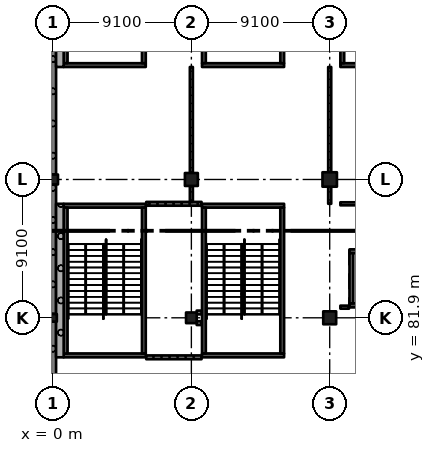
"""IFC4 building model, lengths in metres.
Left out: names, types, materials, properties, quantities, classifications, styles, units other than length and angle.
Written with IfcOpenShell. Run it as: python <this file> out.ifc"""

import sys

from ifc_helpers import new_model, si_unit, direction, frame, frame_2d, origin, origin_2d, place, context, subcontext, project, spatial, rectangle, extrude, element, fill, save


model = new_model("IFC4")
c1 = context("Model", 3, precision=1e-05, world=origin(), true_north=direction((0.0, 1.0)))
c2 = subcontext(c1, "Body", "Model", "MODEL_VIEW")
j1 = project(units=[si_unit("LENGTHUNIT", "METRE"), si_unit("PLANEANGLEUNIT", "RADIAN")], contexts=[c1])
p1 = place(None, origin())
s1 = spatial("IfcSite", under=j1, at=p1, CompositionType="ELEMENT")
p2 = place(p1, origin())
s2 = spatial("IfcBuilding", under=s1, at=p2, CompositionType="ELEMENT")
p3 = place(p2, origin())
s3 = spatial("IfcBuildingStorey", under=s2, at=p3, CompositionType="ELEMENT", Elevation=0.0)
p4 = place(p3, frame((0.0, 81.9, -0.4), z_axis=(0.0, 0.0, 1.0), x_axis=(1.0, 0.0, 0.0)))
e1 = element("IfcColumn", 1, at=p4, inside=s3, PredefinedType="COLUMN", context=c2, shape_type="SweptSolid", body=[
    extrude(rectangle(XDim=0.5, YDim=0.5, at=origin_2d()), origin(), (0.0, 0.0, 1.0), 6.77),
])
p5 = place(p3, frame((0.0, 91.0, -0.4), z_axis=(0.0, 0.0, 1.0), x_axis=(1.0, 0.0, 0.0)))
e2 = element("IfcColumn", 2, at=p5, inside=s3, PredefinedType="COLUMN", context=c2, shape_type="SweptSolid", body=[
    extrude(rectangle(XDim=0.65, YDim=0.65, at=origin_2d()), origin(), (0.0, 0.0, 1.0), 6.77),
])
p6 = place(p3, frame((9.1, 81.9, -0.4), z_axis=(0.0, 0.0, 1.0), x_axis=(1.0, 0.0, 0.0)))
e3 = element("IfcColumn", 3, at=p6, inside=s3, PredefinedType="COLUMN", context=c2, shape_type="SweptSolid", body=[
    extrude(rectangle(XDim=0.7, YDim=0.7, at=origin_2d()), origin(), (0.0, 0.0, 1.0), 6.77),
])
for number, where, z_axis, x_axis in (
    (4, (9.1, 91.0, -0.4), (0.0, 0.0, 1.0), (1.0, 0.0, 0.0)),
    (5, (18.2, 81.9, -0.4), (0.0, 0.0, 1.0), (1.0, 0.0, 0.0)),
):
    element("IfcColumn", number, at=place(p3, frame(where, z_axis=z_axis, x_axis=x_axis)), inside=s3, PredefinedType="COLUMN", context=c2, shape_type="SweptSolid", body=[
        extrude(rectangle(XDim=0.85, YDim=0.85, at=origin_2d()), origin(), (0.0, 0.0, 1.0), 6.77),
    ])
p7 = place(p3, frame((18.2, 91.0, -0.4), z_axis=(0.0, 0.0, 1.0), x_axis=(1.0, 0.0, 0.0)))
e6 = element("IfcColumn", 6, at=p7, inside=s3, PredefinedType="COLUMN", context=c2, shape_type="SweptSolid", body=[
    extrude(rectangle(XDim=0.95, YDim=0.95, at=origin_2d()), origin(), (0.0, 0.0, 1.0), 6.77),
])
p8 = place(p3, frame((22.5, 82.725, -1.4), z_axis=(0.0, 0.0, 1.0), x_axis=(-1.0, 0.0, 0.0)))
e7 = element("IfcWall", 7, at=p8, inside=s3, PredefinedType="SHEAR", context=c2, shape_type="SweptSolid", body=[
    extrude(rectangle(XDim=3.0, YDim=0.25, at=frame_2d((1.5, 0.0))), origin(), (0.0, 0.0, 1.0), 7.77),
])
p9 = place(p3, frame((22.5, 86.275, -1.4), z_axis=(0.0, 0.0, 1.0), x_axis=(-1.0, 0.0, 0.0)))
e8 = element("IfcWall", 8, at=p9, inside=s3, PredefinedType="SHEAR", context=c2, shape_type="SweptSolid", body=[
    extrude(rectangle(XDim=3.0, YDim=0.25, at=frame_2d((1.5, 0.0))), origin(), (0.0, 0.0, 1.0), 7.77),
])
p10 = place(p9, frame((0.95, 0.0, 1.4)))
e9 = element("IfcOpeningElement", 9, at=p10, cuts=e8, PredefinedType="OPENING", context=c2, shape_type="SweptSolid", body=[
    extrude(rectangle(XDim=1.1, YDim=2.1, at=frame_2d((0.55, 1.05))), frame((0.0, 0.135, 0.0), z_axis=(0.0, -1.0, 0.0), x_axis=(1.0, 0.0, 0.0)), (0.0, 0.0, 1.0), 0.27),
])
p11 = place(p3, frame((19.625, 86.15, -1.4), z_axis=(0.0, 0.0, 1.0), x_axis=(0.0, -1.0, 0.0)))
e10 = element("IfcWall", 10, at=p11, inside=s3, PredefinedType="SHEAR", context=c2, shape_type="SweptSolid", body=[
    extrude(rectangle(XDim=3.3, YDim=0.25, at=frame_2d((1.65, 0.0))), origin(), (0.0, 0.0, 1.0), 7.77),
])
p12 = place(p3, frame((6.1, 98.525, -0.4), z_axis=(0.0, 0.0, 1.0), x_axis=(-1.0, 0.0, 0.0)))
e11 = element("IfcWall", 11, at=p12, inside=s3, PredefinedType="SHEAR", context=c2, shape_type="SweptSolid", body=[
    extrude(rectangle(XDim=5.4, YDim=0.25, at=frame_2d((2.7, 0.0))), origin(), (0.0, 0.0, 1.0), 6.77),
])
p13 = place(p12, frame((1.5, 0.0, 0.4)))
e12 = element("IfcOpeningElement", 12, at=p13, cuts=e11, PredefinedType="OPENING", context=c2, shape_type="SweptSolid", body=[
    extrude(rectangle(XDim=2.4, YDim=2.1, at=frame_2d((1.2, 1.05))), frame((0.0, 0.135, 0.0), z_axis=(0.0, -1.0, 0.0), x_axis=(1.0, 0.0, 0.0)), (0.0, 0.0, 1.0), 0.27),
])
p14 = place(p3, frame((0.825, 108.25, -0.4), z_axis=(0.0, 0.0, 1.0), x_axis=(0.0, -1.0, 0.0)))
e13 = element("IfcWall", 13, at=p14, inside=s3, PredefinedType="SHEAR", context=c2, shape_type="SweptSolid", body=[
    extrude(rectangle(XDim=9.6, YDim=0.25, at=frame_2d((4.8, 0.0))), origin(), (0.0, 0.0, 1.0), 6.77),
])
p15 = place(p3, frame((5.975, 108.25, -0.4), z_axis=(0.0, 0.0, 1.0), x_axis=(0.0, -1.0, 0.0)))
e14 = element("IfcWall", 14, at=p15, inside=s3, PredefinedType="SHEAR", context=c2, shape_type="SweptSolid", body=[
    extrude(rectangle(XDim=9.6, YDim=0.25, at=frame_2d((4.8, 0.0))), origin(), (0.0, 0.0, 1.0), 6.77),
])
p16 = place(p15, frame((7.95, 0.0, 0.4)))
e15 = element("IfcOpeningElement", 15, at=p16, cuts=e14, PredefinedType="OPENING", context=c2, shape_type="SweptSolid", body=[
    extrude(rectangle(XDim=1.2, YDim=2.1, at=frame_2d((0.6, 1.05))), frame((0.0, 0.135, 0.0), z_axis=(0.0, -1.0, 0.0), x_axis=(1.0, 0.0, 0.0)), (0.0, 0.0, 1.0), 0.27),
])
p17 = place(p3, frame((15.2, 98.525, -0.4), z_axis=(0.0, 0.0, 1.0), x_axis=(-1.0, 0.0, 0.0)))
e16 = element("IfcWall", 16, at=p17, inside=s3, PredefinedType="SHEAR", context=c2, shape_type="SweptSolid", body=[
    extrude(rectangle(XDim=5.4, YDim=0.25, at=frame_2d((2.7, 0.0))), origin(), (0.0, 0.0, 1.0), 6.77),
])
p18 = place(p17, frame((1.5, 0.0, 0.4)))
e17 = element("IfcOpeningElement", 17, at=p18, cuts=e16, PredefinedType="OPENING", context=c2, shape_type="SweptSolid", body=[
    extrude(rectangle(XDim=2.4, YDim=2.1, at=frame_2d((1.2, 1.05))), frame((0.0, 0.135, 0.0), z_axis=(0.0, -1.0, 0.0), x_axis=(1.0, 0.0, 0.0)), (0.0, 0.0, 1.0), 0.27),
])
p19 = place(p3, frame((9.925, 108.25, -0.4), z_axis=(0.0, 0.0, 1.0), x_axis=(0.0, -1.0, 0.0)))
e18 = element("IfcWall", 18, at=p19, inside=s3, PredefinedType="SHEAR", context=c2, shape_type="SweptSolid", body=[
    extrude(rectangle(XDim=9.6, YDim=0.25, at=frame_2d((4.8, 0.0))), origin(), (0.0, 0.0, 1.0), 6.77),
])
p20 = place(p3, frame((15.075, 108.25, -0.4), z_axis=(0.0, 0.0, 1.0), x_axis=(0.0, -1.0, 0.0)))
e19 = element("IfcWall", 19, at=p20, inside=s3, PredefinedType="SHEAR", context=c2, shape_type="SweptSolid", body=[
    extrude(rectangle(XDim=9.6, YDim=0.25, at=frame_2d((4.8, 0.0))), origin(), (0.0, 0.0, 1.0), 6.77),
])
p21 = place(p20, frame((7.95, 0.0, 0.4)))
e20 = element("IfcOpeningElement", 20, at=p21, cuts=e19, PredefinedType="OPENING", context=c2, shape_type="SweptSolid", body=[
    extrude(rectangle(XDim=1.2, YDim=2.1, at=frame_2d((0.6, 1.05))), frame((0.0, 0.135, 0.0), z_axis=(0.0, -1.0, 0.0), x_axis=(1.0, 0.0, 0.0)), (0.0, 0.0, 1.0), 0.27),
])
p22 = place(p3, frame((24.3, 98.525, -0.4), z_axis=(0.0, 0.0, 1.0), x_axis=(-1.0, 0.0, 0.0)))
e21 = element("IfcWall", 21, at=p22, inside=s3, PredefinedType="SHEAR", context=c2, shape_type="SweptSolid", body=[
    extrude(rectangle(XDim=5.4, YDim=0.25, at=frame_2d((2.7, 0.0))), origin(), (0.0, 0.0, 1.0), 6.77),
])
p23 = place(p22, frame((1.5, 0.0, 0.4)))
e22 = element("IfcOpeningElement", 22, at=p23, cuts=e21, PredefinedType="OPENING", context=c2, shape_type="SweptSolid", body=[
    extrude(rectangle(XDim=2.4, YDim=2.1, at=frame_2d((1.2, 1.05))), frame((0.0, 0.135, 0.0), z_axis=(0.0, -1.0, 0.0), x_axis=(1.0, 0.0, 0.0)), (0.0, 0.0, 1.0), 0.27),
])
p24 = place(p3, frame((19.025, 108.25, -0.4), z_axis=(0.0, 0.0, 1.0), x_axis=(0.0, -1.0, 0.0)))
e23 = element("IfcWall", 23, at=p24, inside=s3, PredefinedType="SHEAR", context=c2, shape_type="SweptSolid", body=[
    extrude(rectangle(XDim=9.6, YDim=0.25, at=frame_2d((4.8, 0.0))), origin(), (0.0, 0.0, 1.0), 6.77),
])
p25 = place(p3, frame((6.1, 79.425, -0.4), z_axis=(0.0, 0.0, 1.0), x_axis=(-1.0, 0.0, 0.0)))
e24 = element("IfcWall", 24, at=p25, inside=s3, PredefinedType="SHEAR", context=c2, shape_type="SweptSolid", body=[
    extrude(rectangle(XDim=5.4, YDim=0.25, at=frame_2d((2.7, 0.0))), origin(), (0.0, 0.0, 1.0), 6.77),
])
p26 = place(p3, frame((6.1, 89.275, -0.4), z_axis=(0.0, 0.0, 1.0), x_axis=(-1.0, 0.0, 0.0)))
e25 = element("IfcWall", 25, at=p26, inside=s3, PredefinedType="SHEAR", context=c2, shape_type="SweptSolid", body=[
    extrude(rectangle(XDim=5.4, YDim=0.25, at=frame_2d((2.7, 0.0))), origin(), (0.0, 0.0, 1.0), 6.77),
])
p27 = place(p26, frame((1.5, 0.0, 0.4)))
e26 = element("IfcOpeningElement", 26, at=p27, cuts=e25, PredefinedType="OPENING", context=c2, shape_type="SweptSolid", body=[
    extrude(rectangle(XDim=2.4, YDim=2.1, at=frame_2d((1.2, 1.05))), frame((0.0, 0.135, 0.0), z_axis=(0.0, -1.0, 0.0), x_axis=(1.0, 0.0, 0.0)), (0.0, 0.0, 1.0), 0.27),
])
for number, where, z_axis, x_axis in (
    (27, (0.825, 89.15, -0.4), (0.0, 0.0, 1.0), (0.0, -1.0, 0.0)),
    (28, (5.975, 89.15, -0.4), (0.0, 0.0, 1.0), (0.0, -1.0, 0.0)),
):
    element("IfcWall", number, at=place(p3, frame(where, z_axis=z_axis, x_axis=x_axis)), inside=s3, PredefinedType="SHEAR", context=c2, shape_type="SweptSolid", body=[
        extrude(rectangle(XDim=9.6, YDim=0.25, at=frame_2d((4.8, 0.0))), origin(), (0.0, 0.0, 1.0), 6.77),
    ])
p28 = place(p3, frame((15.2, 79.425, -0.4), z_axis=(0.0, 0.0, 1.0), x_axis=(-1.0, 0.0, 0.0)))
e29 = element("IfcWall", 29, at=p28, inside=s3, PredefinedType="SHEAR", context=c2, shape_type="SweptSolid", body=[
    extrude(rectangle(XDim=5.4, YDim=0.25, at=frame_2d((2.7, 0.0))), origin(), (0.0, 0.0, 1.0), 6.77),
])
p29 = place(p3, frame((15.2, 89.275, -0.4), z_axis=(0.0, 0.0, 1.0), x_axis=(-1.0, 0.0, 0.0)))
e30 = element("IfcWall", 30, at=p29, inside=s3, PredefinedType="SHEAR", context=c2, shape_type="SweptSolid", body=[
    extrude(rectangle(XDim=5.4, YDim=0.25, at=frame_2d((2.7, 0.0))), origin(), (0.0, 0.0, 1.0), 6.77),
])
p30 = place(p29, frame((1.5, 0.0, 0.4)))
e31 = element("IfcOpeningElement", 31, at=p30, cuts=e30, PredefinedType="OPENING", context=c2, shape_type="SweptSolid", body=[
    extrude(rectangle(XDim=2.4, YDim=2.1, at=frame_2d((1.2, 1.05))), frame((0.0, 0.135, 0.0), z_axis=(0.0, -1.0, 0.0), x_axis=(1.0, 0.0, 0.0)), (0.0, 0.0, 1.0), 0.27),
])
for number, where, z_axis, x_axis in (
    (32, (9.925, 89.15, -0.4), (0.0, 0.0, 1.0), (0.0, -1.0, 0.0)),
    (33, (15.075, 89.15, -0.4), (0.0, 0.0, 1.0), (0.0, -1.0, 0.0)),
):
    element("IfcWall", number, at=place(p3, frame(where, z_axis=z_axis, x_axis=x_axis)), inside=s3, PredefinedType="SHEAR", context=c2, shape_type="SweptSolid", body=[
        extrude(rectangle(XDim=9.6, YDim=0.25, at=frame_2d((4.8, 0.0))), origin(), (0.0, 0.0, 1.0), 6.77),
    ])
p31 = place(p3, frame((0.025, 99.825, 0.0), z_axis=(0.0, 0.0, 1.0), x_axis=(0.0, -1.0, 0.0)))
e34 = element("IfcWall", 34, at=p31, inside=s3, PredefinedType="SOLIDWALL", context=c2, shape_type="SweptSolid", body=[
    extrude(rectangle(XDim=8.5, YDim=0.35, at=frame_2d((4.25, 0.0))), origin(), (0.0, 0.0, 1.0), 5.27),
])
p32 = place(p31, frame((1.625, 0.0, 0.0)))
e35 = element("IfcOpeningElement", 35, at=p32, cuts=e34, PredefinedType="OPENING", context=c2, shape_type="SweptSolid", body=[
    extrude(rectangle(XDim=2.4, YDim=2.4, at=frame_2d((1.2, 1.2))), frame((0.0, 0.185, 0.0), z_axis=(0.0, -1.0, 0.0), x_axis=(1.0, 0.0, 0.0)), (0.0, 0.0, 1.0), 0.37),
])
p33 = place(p31, frame((4.625, 0.0, 0.0)))
e36 = element("IfcOpeningElement", 36, at=p33, cuts=e34, PredefinedType="OPENING", context=c2, shape_type="SweptSolid", body=[
    extrude(rectangle(XDim=2.4, YDim=2.4, at=frame_2d((1.2, 1.2))), frame((0.0, 0.185, 0.0), z_axis=(0.0, -1.0, 0.0), x_axis=(1.0, 0.0, 0.0)), (0.0, 0.0, 1.0), 0.37),
])
p34 = place(p3, frame((0.025, 90.675, 0.0), z_axis=(0.0, 0.0, 1.0), x_axis=(0.0, -1.0, 0.0)))
e37 = element("IfcWall", 37, at=p34, inside=s3, PredefinedType="SOLIDWALL", context=c2, shape_type="SweptSolid", body=[
    extrude(rectangle(XDim=8.525, YDim=0.35, at=frame_2d((4.263, 0.0))), origin(), (0.0, 0.0, 1.0), 5.27),
])
p35 = place(p3, frame((0.025, 81.65, 0.0), z_axis=(0.0, 0.0, 1.0), x_axis=(0.0, -1.0, 0.0)))
e38 = element("IfcWall", 38, at=p35, inside=s3, PredefinedType="SOLIDWALL", context=c2, shape_type="SweptSolid", body=[
    extrude(rectangle(XDim=8.5, YDim=0.35, at=frame_2d((4.25, 0.0))), origin(), (0.0, 0.0, 1.0), 5.27),
])
p36 = place(p3, frame((0.45, 98.4, 0.0), z_axis=(0.0, 0.0, 1.0), x_axis=(0.0, 1.0, 0.0)))
e39 = element("IfcWall", 39, at=p36, inside=s3, PredefinedType="SOLIDWALL", context=c2, shape_type="SweptSolid", body=[
    extrude(rectangle(XDim=10.1, YDim=0.5, at=frame_2d((5.05, 0.0))), origin(), (0.0, 0.0, 1.0), 6.02),
])
p37 = place(p3, frame((0.45, 79.3, 0.0), z_axis=(0.0, 0.0, 1.0), x_axis=(0.0, 1.0, 0.0)))
e40 = element("IfcWall", 40, at=p37, inside=s3, PredefinedType="SOLIDWALL", context=c2, shape_type="SweptSolid", body=[
    extrude(rectangle(XDim=10.1, YDim=0.5, at=frame_2d((5.05, 0.0))), origin(), (0.0, 0.0, 1.0), 6.02),
])
p38 = place(p3, frame((6.13, 89.4, 0.0), z_axis=(0.0, 0.0, 1.0), x_axis=(1.0, 0.0, 0.0)))
e41 = element("IfcWall", 41, at=p38, inside=s3, PredefinedType="SOLIDWALL", context=c2, shape_type="SweptSolid", body=[
    extrude(rectangle(XDim=3.64, YDim=0.25, at=frame_2d((1.82, 0.0))), origin(), (0.0, 0.0, 1.0), 6.02),
])
p39 = place(p38, frame((1.02, 0.0, 0.0)))
e42 = element("IfcOpeningElement", 42, at=p39, cuts=e41, PredefinedType="OPENING", context=c2, shape_type="SweptSolid", body=[
    extrude(rectangle(XDim=1.0, YDim=2.1, at=frame_2d((0.5, 1.05))), frame((0.0, 0.135, 0.0), z_axis=(0.0, -1.0, 0.0), x_axis=(1.0, 0.0, 0.0)), (0.0, 0.0, 1.0), 0.27),
])
p40 = place(p3, frame((9.1, 90.575, 0.0), z_axis=(0.0, 0.0, 1.0), x_axis=(0.0, -1.0, 0.0)))
e43 = element("IfcWall", 43, at=p40, inside=s3, PredefinedType="PARTITIONING", context=c2, shape_type="SweptSolid", body=[
    extrude(rectangle(XDim=1.05, YDim=0.2, at=frame_2d((0.525, 0.0))), origin(), (0.0, 0.0, 1.0), 5.32),
])
p41 = place(p3, frame((9.1, 98.4, 0.0), z_axis=(0.0, 0.0, 1.0), x_axis=(0.0, -1.0, 0.0)))
e44 = element("IfcWall", 44, at=p41, inside=s3, PredefinedType="PARTITIONING", context=c2, shape_type="SweptSolid", body=[
    extrude(rectangle(XDim=6.975, YDim=0.2, at=frame_2d((3.487, 0.0))), origin(), (0.0, 0.0, 1.0), 5.32),
])
p42 = place(p41, frame((0.85, 0.0, 0.0)))
e45 = element("IfcOpeningElement", 45, at=p42, cuts=e44, PredefinedType="OPENING", context=c2, shape_type="SweptSolid", body=[
    extrude(rectangle(XDim=1.8, YDim=2.4, at=frame_2d((0.9, 1.2))), frame((0.0, 0.11, 0.0), z_axis=(0.0, -1.0, 0.0), x_axis=(1.0, 0.0, 0.0)), (0.0, 0.0, 1.0), 0.22),
])
p43 = place(p41, frame((4.35, 0.0, 0.0)))
e46 = element("IfcOpeningElement", 46, at=p43, cuts=e44, PredefinedType="OPENING", context=c2, shape_type="SweptSolid", body=[
    extrude(rectangle(XDim=1.8, YDim=2.4, at=frame_2d((0.9, 1.2))), frame((0.0, 0.11, 0.0), z_axis=(0.0, -1.0, 0.0), x_axis=(1.0, 0.0, 0.0)), (0.0, 0.0, 1.0), 0.22),
])
p44 = place(p3, frame((9.45, 81.55, 0.0), z_axis=(0.0, 0.0, 1.0), x_axis=(1.0, 0.0, 0.0)))
e47 = element("IfcWall", 47, at=p44, inside=s3, PredefinedType="SOLIDWALL", context=c2, shape_type="SweptSolid", body=[
    extrude(rectangle(XDim=0.32, YDim=0.25, at=frame_2d((0.16, 0.0))), origin(), (0.0, 0.0, 1.0), 6.02),
])
p45 = place(p3, frame((9.77, 79.3, 0.0), z_axis=(0.0, 0.0, 1.0), x_axis=(-1.0, 0.0, 0.0)))
e48 = element("IfcWall", 48, at=p45, inside=s3, PredefinedType="SOLIDWALL", context=c2, shape_type="SweptSolid", body=[
    extrude(rectangle(XDim=3.64, YDim=0.25, at=frame_2d((1.82, 0.0))), origin(), (0.0, 0.0, 1.0), 6.02),
])
p46 = place(p3, frame((9.77, 82.25, 0.0), z_axis=(0.0, 0.0, 1.0), x_axis=(-1.0, 0.0, 0.0)))
e49 = element("IfcWall", 49, at=p46, inside=s3, PredefinedType="SOLIDWALL", context=c2, shape_type="SweptSolid", body=[
    extrude(rectangle(XDim=0.32, YDim=0.25, at=frame_2d((0.16, 0.0))), origin(), (0.0, 0.0, 1.0), 6.02),
])
p47 = place(p3, frame((18.2, 90.525, 0.0), z_axis=(0.0, 0.0, 1.0), x_axis=(0.0, -1.0, 0.0)))
e50 = element("IfcWall", 50, at=p47, inside=s3, PredefinedType="PARTITIONING", context=c2, shape_type="SweptSolid", body=[
    extrude(rectangle(XDim=1.125, YDim=0.2, at=frame_2d((0.562, 0.0))), origin(), (0.0, 0.0, 1.0), 5.32),
])
p48 = place(p3, frame((18.2, 98.4, 0.0), z_axis=(0.0, 0.0, 1.0), x_axis=(0.0, -1.0, 0.0)))
e51 = element("IfcWall", 51, at=p48, inside=s3, PredefinedType="PARTITIONING", context=c2, shape_type="SweptSolid", body=[
    extrude(rectangle(XDim=6.925, YDim=0.2, at=frame_2d((3.462, 0.0))), origin(), (0.0, 0.0, 1.0), 5.32),
])
p49 = place(p48, frame((0.85, 0.0, 0.0)))
e52 = element("IfcOpeningElement", 52, at=p49, cuts=e51, PredefinedType="OPENING", context=c2, shape_type="SweptSolid", body=[
    extrude(rectangle(XDim=1.8, YDim=2.4, at=frame_2d((0.9, 1.2))), frame((0.0, 0.11, 0.0), z_axis=(0.0, -1.0, 0.0), x_axis=(1.0, 0.0, 0.0)), (0.0, 0.0, 1.0), 0.22),
])
p50 = place(p48, frame((4.25, 0.0, 0.0)))
e53 = element("IfcOpeningElement", 53, at=p50, cuts=e51, PredefinedType="OPENING", context=c2, shape_type="SweptSolid", body=[
    extrude(rectangle(XDim=1.8, YDim=2.4, at=frame_2d((0.9, 1.2))), frame((0.0, 0.11, 0.0), z_axis=(0.0, -1.0, 0.0), x_axis=(1.0, 0.0, 0.0)), (0.0, 0.0, 1.0), 0.22),
])
p51 = place(p3, frame((19.47, 82.6, 0.0), z_axis=(0.0, 0.0, 1.0), x_axis=(-1.0, 0.0, 0.0)))
e54 = element("IfcWall", 54, at=p51, inside=s3, PredefinedType="PARTITIONING", context=c2, shape_type="SweptSolid", body=[
    extrude(rectangle(XDim=0.57, YDim=0.2, at=frame_2d((0.285, 0.0))), origin(), (0.0, 0.0, 1.0), 6.02),
])
p52 = place(p3, frame((24.3, 89.4, 0.0), z_axis=(0.0, 0.0, 1.0), x_axis=(-1.0, 0.0, 0.0)))
e55 = element("IfcWall", 55, at=p52, inside=s3, PredefinedType="PARTITIONING", context=c2, shape_type="SweptSolid", body=[
    extrude(rectangle(XDim=5.4, YDim=0.2, at=frame_2d((2.7, 0.0))), origin(), (0.0, 0.0, 1.0), 6.02),
])
p53 = place(p52, frame((1.85, 0.0, 0.0)))
e56 = element("IfcOpeningElement", 56, at=p53, cuts=e55, PredefinedType="OPENING", context=c2, shape_type="SweptSolid", body=[
    extrude(rectangle(XDim=1.8, YDim=2.4, at=frame_2d((0.9, 1.2))), frame((0.0, 0.11, 0.0), z_axis=(0.0, -1.0, 0.0), x_axis=(1.0, 0.0, 0.0)), (0.0, 0.0, 1.0), 0.22),
])
p54 = place(p32, frame((2.4, 0.0, 0.0), z_axis=(0.0, 0.0, 1.0), x_axis=(-1.0, 0.0, 0.0)))
e57 = element("IfcDoor", 57, at=p54, inside=s3, OperationType="DOUBLE_DOOR_SINGLE_SWING", PredefinedType="DOOR", context=c2, shape_type="SweptSolid", body=[
    extrude(rectangle(XDim=2.4, YDim=2.4, at=frame_2d((1.2, 1.2))), frame((0.0, 0.025, 0.0), z_axis=(0.0, -1.0, 0.0), x_axis=(1.0, 0.0, 0.0)), (0.0, 0.0, 1.0), 0.05),
])
fill(e35, e57)
p55 = place(p33, frame((2.4, 0.0, 0.0), z_axis=(0.0, 0.0, 1.0), x_axis=(-1.0, 0.0, 0.0)))
e58 = element("IfcDoor", 58, at=p55, inside=s3, OperationType="DOUBLE_DOOR_SINGLE_SWING", PredefinedType="DOOR", context=c2, shape_type="SweptSolid", body=[
    extrude(rectangle(XDim=2.4, YDim=2.4, at=frame_2d((1.2, 1.2))), frame((0.0, 0.025, 0.0), z_axis=(0.0, -1.0, 0.0), x_axis=(1.0, 0.0, 0.0)), (0.0, 0.0, 1.0), 0.05),
])
fill(e36, e58)
p56 = place(p39, origin())
e59 = element("IfcDoor", 59, at=p56, inside=s3, OperationType="SINGLE_SWING_RIGHT", PredefinedType="DOOR", context=c2, shape_type="SweptSolid", body=[
    extrude(rectangle(XDim=1.0, YDim=2.1, at=frame_2d((0.5, 1.05))), frame((0.0, 0.025, 0.0), z_axis=(0.0, -1.0, 0.0), x_axis=(1.0, 0.0, 0.0)), (0.0, 0.0, 1.0), 0.05),
])
fill(e42, e59)
p57 = place(p42, origin())
e60 = element("IfcDoor", 60, at=p57, inside=s3, OperationType="DOUBLE_DOOR_SINGLE_SWING", PredefinedType="DOOR", context=c2, shape_type="SweptSolid", body=[
    extrude(rectangle(XDim=1.8, YDim=2.4, at=frame_2d((0.9, 1.2))), frame((0.0, 0.025, 0.0), z_axis=(0.0, -1.0, 0.0), x_axis=(1.0, 0.0, 0.0)), (0.0, 0.0, 1.0), 0.05),
])
fill(e45, e60)
p58 = place(p43, origin())
e61 = element("IfcDoor", 61, at=p58, inside=s3, OperationType="DOUBLE_DOOR_SINGLE_SWING", PredefinedType="DOOR", context=c2, shape_type="SweptSolid", body=[
    extrude(rectangle(XDim=1.8, YDim=2.4, at=frame_2d((0.9, 1.2))), frame((0.0, 0.025, 0.0), z_axis=(0.0, -1.0, 0.0), x_axis=(1.0, 0.0, 0.0)), (0.0, 0.0, 1.0), 0.05),
])
fill(e46, e61)
p59 = place(p49, origin())
e62 = element("IfcDoor", 62, at=p59, inside=s3, OperationType="DOUBLE_DOOR_SINGLE_SWING", PredefinedType="DOOR", context=c2, shape_type="SweptSolid", body=[
    extrude(rectangle(XDim=1.8, YDim=2.4, at=frame_2d((0.9, 1.2))), frame((0.0, 0.025, 0.0), z_axis=(0.0, -1.0, 0.0), x_axis=(1.0, 0.0, 0.0)), (0.0, 0.0, 1.0), 0.05),
])
fill(e52, e62)
p60 = place(p50, origin())
e63 = element("IfcDoor", 63, at=p60, inside=s3, OperationType="DOUBLE_DOOR_SINGLE_SWING", PredefinedType="DOOR", context=c2, shape_type="SweptSolid", body=[
    extrude(rectangle(XDim=1.8, YDim=2.4, at=frame_2d((0.9, 1.2))), frame((0.0, 0.025, 0.0), z_axis=(0.0, -1.0, 0.0), x_axis=(1.0, 0.0, 0.0)), (0.0, 0.0, 1.0), 0.05),
])
fill(e53, e63)
p61 = place(p13, origin())
e64 = element("IfcDoor", 64, at=p61, inside=s3, OperationType="DOUBLE_DOOR_SINGLE_SWING", PredefinedType="DOOR", context=c2, shape_type="SweptSolid", body=[
    extrude(rectangle(XDim=2.4, YDim=2.1, at=frame_2d((1.2, 1.05))), frame((0.0, 0.025, 0.0), z_axis=(0.0, -1.0, 0.0), x_axis=(1.0, 0.0, 0.0)), (0.0, 0.0, 1.0), 0.05),
])
fill(e12, e64)
p62 = place(p18, origin())
e65 = element("IfcDoor", 65, at=p62, inside=s3, OperationType="DOUBLE_DOOR_SINGLE_SWING", PredefinedType="DOOR", context=c2, shape_type="SweptSolid", body=[
    extrude(rectangle(XDim=2.4, YDim=2.1, at=frame_2d((1.2, 1.05))), frame((0.0, 0.025, 0.0), z_axis=(0.0, -1.0, 0.0), x_axis=(1.0, 0.0, 0.0)), (0.0, 0.0, 1.0), 0.05),
])
fill(e17, e65)
p63 = place(p27, origin())
e66 = element("IfcDoor", 66, at=p63, inside=s3, OperationType="DOUBLE_DOOR_SINGLE_SWING", PredefinedType="DOOR", context=c2, shape_type="SweptSolid", body=[
    extrude(rectangle(XDim=2.4, YDim=2.1, at=frame_2d((1.2, 1.05))), frame((0.0, 0.025, 0.0), z_axis=(0.0, -1.0, 0.0), x_axis=(1.0, 0.0, 0.0)), (0.0, 0.0, 1.0), 0.05),
])
fill(e26, e66)
p64 = place(p30, origin())
e67 = element("IfcDoor", 67, at=p64, inside=s3, OperationType="DOUBLE_DOOR_SINGLE_SWING", PredefinedType="DOOR", context=c2, shape_type="SweptSolid", body=[
    extrude(rectangle(XDim=2.4, YDim=2.1, at=frame_2d((1.2, 1.05))), frame((0.0, 0.025, 0.0), z_axis=(0.0, -1.0, 0.0), x_axis=(1.0, 0.0, 0.0)), (0.0, 0.0, 1.0), 0.05),
])
fill(e31, e67)
p65 = place(p16, origin())
e68 = element("IfcDoor", 68, at=p65, inside=s3, OperationType="SINGLE_SWING_LEFT", PredefinedType="DOOR", context=c2, shape_type="SweptSolid", body=[
    extrude(rectangle(XDim=1.2, YDim=2.1, at=frame_2d((0.6, 1.05))), frame((0.0, 0.025, 0.0), z_axis=(0.0, -1.0, 0.0), x_axis=(1.0, 0.0, 0.0)), (0.0, 0.0, 1.0), 0.05),
])
fill(e15, e68)
p66 = place(p21, origin())
e69 = element("IfcDoor", 69, at=p66, inside=s3, OperationType="SINGLE_SWING_LEFT", PredefinedType="DOOR", context=c2, shape_type="SweptSolid", body=[
    extrude(rectangle(XDim=1.2, YDim=2.1, at=frame_2d((0.6, 1.05))), frame((0.0, 0.025, 0.0), z_axis=(0.0, -1.0, 0.0), x_axis=(1.0, 0.0, 0.0)), (0.0, 0.0, 1.0), 0.05),
])
fill(e20, e69)
save(model, sys.argv[1])
